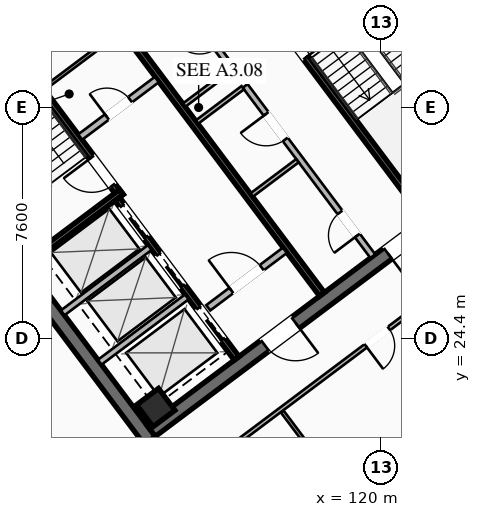
"""IFC4 building model, lengths in metres.
Left out: names, types, materials, properties, quantities, classifications, styles, units other than length and angle.
Written with IfcOpenShell. Run it as: python <this file> out.ifc"""

import sys

from ifc_helpers import new_model, si_unit, direction, frame, frame_2d, origin, origin_2d, place, context, subcontext, project, spatial, rectangle, hollow_rectangle, extrude, element, fill, save


model = new_model("IFC4")
c1 = context("Model", 3, precision=1e-05, world=origin(), true_north=direction((0.0, 1.0)))
c2 = subcontext(c1, "Body", "Model", "MODEL_VIEW")
j1 = project(units=[si_unit("LENGTHUNIT", "METRE"), si_unit("PLANEANGLEUNIT", "RADIAN")], contexts=[c1])
p1 = place(None, origin())
s1 = spatial("IfcSite", under=j1, at=p1, CompositionType="ELEMENT")
p2 = place(p1, origin())
s2 = spatial("IfcBuilding", under=s1, at=p2, CompositionType="ELEMENT")
p3 = place(p2, frame((0.0, 0.0, 214.85)))
s3 = spatial("IfcBuildingStorey", under=s2, at=p3, CompositionType="ELEMENT", Elevation=214.85)
for number, where, z_axis, x_axis in (
    (1, (112.396, 21.047, 0.0), (0.0, 0.0, 1.0), (-0.6, 0.8, 0.0)),
    (2, (115.604, 42.953, 0.0), (0.0, 0.0, 1.0), (0.6, -0.8, 0.0)),
):
    element("IfcWall", number, at=place(p3, frame(where, z_axis=z_axis, x_axis=x_axis)), inside=s3, PredefinedType="SHEAR", context=c2, shape_type="SweptSolid", body=[
        extrude(rectangle(XDim=15.6, YDim=0.45, at=frame_2d((7.8, 0.0))), origin(), (0.0, 0.0, 1.0), 3.55),
    ])
p4 = place(p3, frame((124.649, 30.518, 0.0), z_axis=(0.0, 0.0, 1.0), x_axis=(-0.8, -0.6, 0.0)))
e3 = element("IfcWall", 3, at=p4, inside=s3, PredefinedType="SHEAR", context=c2, shape_type="SweptSolid", body=[
    extrude(rectangle(XDim=15.26, YDim=0.45, at=frame_2d((7.63, 0.0))), origin(), (0.0, 0.0, 1.0), 3.55),
])
p5 = place(p4, frame((9.33, 0.0, 0.0)))
e4 = element("IfcOpeningElement", 4, at=p5, cuts=e3, PredefinedType="OPENING", context=c2, shape_type="SweptSolid", body=[
    extrude(rectangle(XDim=1.25, YDim=2.25, at=frame_2d((0.625, 1.125))), frame((0.0, 0.235, 0.0), z_axis=(0.0, -1.0, 0.0), x_axis=(1.0, 0.0, 0.0)), (0.0, 0.0, 1.0), 0.47),
])
p6 = place(p4, frame((4.28, 0.0, 0.0)))
e5 = element("IfcOpeningElement", 5, at=p6, cuts=e3, PredefinedType="OPENING", context=c2, shape_type="SweptSolid", body=[
    extrude(rectangle(XDim=1.25, YDim=2.25, at=frame_2d((0.625, 1.125))), frame((0.0, 0.235, 0.0), z_axis=(0.0, -1.0, 0.0), x_axis=(1.0, 0.0, 0.0)), (0.0, 0.0, 1.0), 0.47),
])
p7 = place(p3, frame((103.351, 33.482, 0.0), z_axis=(0.0, 0.0, 1.0), x_axis=(0.8, 0.6, 0.0)))
e6 = element("IfcWall", 6, at=p7, inside=s3, PredefinedType="SHEAR", context=c2, shape_type="SweptSolid", body=[
    extrude(rectangle(XDim=15.26, YDim=0.45, at=frame_2d((7.63, 0.0))), origin(), (0.0, 0.0, 1.0), 3.55),
])
p8 = place(p7, frame((4.68, 0.0, 0.0)))
e7 = element("IfcOpeningElement", 7, at=p8, cuts=e6, PredefinedType="OPENING", context=c2, shape_type="SweptSolid", body=[
    extrude(rectangle(XDim=1.25, YDim=2.25, at=frame_2d((0.625, 1.125))), frame((0.0, 0.235, 0.0), z_axis=(0.0, -1.0, 0.0), x_axis=(1.0, 0.0, 0.0)), (0.0, 0.0, 1.0), 0.47),
])
p9 = place(p7, frame((9.73, 0.0, 0.0)))
e8 = element("IfcOpeningElement", 8, at=p9, cuts=e6, PredefinedType="OPENING", context=c2, shape_type="SweptSolid", body=[
    extrude(rectangle(XDim=1.25, YDim=2.25, at=frame_2d((0.625, 1.125))), frame((0.0, 0.235, 0.0), z_axis=(0.0, -1.0, 0.0), x_axis=(1.0, 0.0, 0.0)), (0.0, 0.0, 1.0), 0.47),
])
p10 = place(p3, frame((112.59, 22.13, 0.0), z_axis=(0.0, 0.0, 1.0), x_axis=(0.799999996291, 0.600000004945, 0.0)))
e9 = element("IfcColumn", 9, at=p10, inside=s3, PredefinedType="COLUMN", context=c2, shape_type="SweptSolid", body=[
    extrude(hollow_rectangle(XDim=0.9, YDim=0.9, WallThickness=0.04, at=origin_2d()), origin(), (0.0, 0.0, 1.0), 3.37),
])
p11 = place(p3, frame((111.44, 29.08, 0.0), z_axis=(0.0, 0.0, 1.0), x_axis=(-0.59999041401, 0.800007189403, 0.0)))
e10 = element("IfcWall", 10, at=p11, inside=s3, PredefinedType="SHEAR", context=c2, shape_type="SweptSolid", body=[
    extrude(rectangle(XDim=8.15, YDim=0.2, at=frame_2d((4.075, 0.0))), origin(), (0.0, 0.0, 1.0), 3.37),
])
p12 = place(p11, frame((0.45, 0.0, 0.0)))
e11 = element("IfcOpeningElement", 11, at=p12, cuts=e10, PredefinedType="OPENING", context=c2, shape_type="SweptSolid", body=[
    extrude(rectangle(XDim=1.15, YDim=2.2, at=frame_2d((0.575, 1.1))), frame((0.0, 0.11, 0.0), z_axis=(0.0, -1.0, 0.0), x_axis=(1.0, 0.0, 0.0)), (0.0, 0.0, 1.0), 0.22),
])
p13 = place(p3, frame((108.316, 26.862, 0.0), z_axis=(0.0, 0.0, 1.0), x_axis=(0.800014909178, 0.599980120581, 0.0)))
e12 = element("IfcWall", 12, at=p13, inside=s3, PredefinedType="SHEAR", context=c2, shape_type="SweptSolid", body=[
    extrude(rectangle(XDim=3.93, YDim=0.2, at=frame_2d((1.965, 0.0))), origin(), (0.0, 0.0, 1.0), 3.37),
])
p14 = place(p3, frame((116.56, 34.92, 0.0), z_axis=(0.0, 0.0, 1.0), x_axis=(0.59999041401, -0.800007189403, 0.0)))
e13 = element("IfcWall", 13, at=p14, inside=s3, PredefinedType="SHEAR", context=c2, shape_type="SweptSolid", body=[
    extrude(rectangle(XDim=8.15, YDim=0.2, at=frame_2d((4.075, 0.0))), origin(), (0.0, 0.0, 1.0), 3.37),
])
p15 = place(p14, frame((0.45, 0.0, 0.0)))
e14 = element("IfcOpeningElement", 14, at=p15, cuts=e13, PredefinedType="OPENING", context=c2, shape_type="SweptSolid", body=[
    extrude(rectangle(XDim=1.15, YDim=2.2, at=frame_2d((0.575, 1.1))), frame((0.0, 0.11, 0.0), z_axis=(0.0, -1.0, 0.0), x_axis=(1.0, 0.0, 0.0)), (0.0, 0.0, 1.0), 0.22),
])
p16 = place(p3, frame((118.058, 25.856, 0.0), z_axis=(0.0, 0.0, 1.0), x_axis=(-0.600002657301, 0.799998007018, 0.0)))
e15 = element("IfcWall", 15, at=p16, inside=s3, PredefinedType="SHEAR", context=c2, shape_type="SweptSolid", body=[
    extrude(rectangle(XDim=14.7, YDim=0.2, at=frame_2d((7.35, 0.0))), origin(), (0.0, 0.0, 1.0), 3.37),
])
p17 = place(p3, frame((110.104, 31.028, 0.0), z_axis=(0.0, 0.0, 1.0), x_axis=(0.800018601094, 0.59997519774, 0.0)))
e16 = element("IfcWall", 16, at=p17, inside=s3, PredefinedType="SOLIDWALL", context=c2, shape_type="SweptSolid", body=[
    extrude(rectangle(XDim=3.15, YDim=0.22, at=frame_2d((1.575, 0.0))), origin(), (0.0, 0.0, 1.0), 2.723),
])
p18 = place(p17, frame((1.1, 0.0, 0.0)))
e17 = element("IfcOpeningElement", 17, at=p18, cuts=e16, PredefinedType="OPENING", context=c2, shape_type="SweptSolid", body=[
    extrude(rectangle(XDim=0.95, YDim=2.05, at=frame_2d((0.475, 1.025))), frame((0.0, 0.12, 0.0), z_axis=(0.0, -1.0, 0.0), x_axis=(1.0, 0.0, 0.0)), (0.0, 0.0, 1.0), 0.24),
])
p19 = place(p3, frame((114.316, 25.412, 0.0), z_axis=(0.0, 0.0, 1.0), x_axis=(0.800018601094, 0.59997519774, 0.0)))
e18 = element("IfcWall", 18, at=p19, inside=s3, PredefinedType="SOLIDWALL", context=c2, shape_type="SweptSolid", body=[
    extrude(rectangle(XDim=3.15, YDim=0.22, at=frame_2d((1.575, 0.0))), origin(), (0.0, 0.0, 1.0), 2.723),
])
p20 = place(p19, frame((0.95, 0.0, 0.0)))
e19 = element("IfcOpeningElement", 19, at=p20, cuts=e18, PredefinedType="OPENING", context=c2, shape_type="SweptSolid", body=[
    extrude(rectangle(XDim=1.25, YDim=2.25, at=frame_2d((0.625, 1.125))), frame((0.0, 0.12, 0.0), z_axis=(0.0, -1.0, 0.0), x_axis=(1.0, 0.0, 0.0)), (0.0, 0.0, 1.0), 0.24),
])
p21 = place(p3, frame((115.25, 23.75, 0.0), z_axis=(0.0, 0.0, 1.0), x_axis=(-0.599994036198, 0.800004472816, 0.0)))
e20 = element("IfcWall", 20, at=p21, inside=s3, PredefinedType="SHEAR", context=c2, shape_type="SweptSolid", body=[
    extrude(rectangle(XDim=6.55, YDim=0.2, at=frame_2d((3.275, 0.0))), origin(), (0.0, 0.0, 1.0), 3.37),
])
p22 = place(p21, frame((4.975, 0.0, 0.0)))
e21 = element("IfcOpeningElement", 21, at=p22, cuts=e20, PredefinedType="OPENING", context=c2, shape_type="SweptSolid", body=[
    extrude(rectangle(XDim=1.3, YDim=2.25, at=frame_2d((0.65, 1.125))), frame((0.0, 0.11, 0.0), z_axis=(0.0, -1.0, 0.0), x_axis=(1.0, 0.0, 0.0)), (0.0, 0.0, 1.0), 0.22),
])
p23 = place(p21, frame((2.975, 0.0, 0.0)))
e22 = element("IfcOpeningElement", 22, at=p23, cuts=e20, PredefinedType="OPENING", context=c2, shape_type="SweptSolid", body=[
    extrude(rectangle(XDim=1.3, YDim=2.25, at=frame_2d((0.65, 1.125))), frame((0.0, 0.11, 0.0), z_axis=(0.0, -1.0, 0.0), x_axis=(1.0, 0.0, 0.0)), (0.0, 0.0, 1.0), 0.22),
])
p24 = place(p21, frame((0.775, 0.0, 0.0)))
e23 = element("IfcOpeningElement", 23, at=p24, cuts=e20, PredefinedType="OPENING", context=c2, shape_type="SweptSolid", body=[
    extrude(rectangle(XDim=1.3, YDim=2.25, at=frame_2d((0.65, 1.125))), frame((0.0, 0.11, 0.0), z_axis=(0.0, -1.0, 0.0), x_axis=(1.0, 0.0, 0.0)), (0.0, 0.0, 1.0), 0.22),
])
for number, where, z_axis, x_axis in (
    (24, (110.746, 23.622, 0.0), (0.0, 0.0, 1.0), (0.8, 0.6, 0.0)),
    (25, (109.528, 25.246, 0.0), (0.0, 0.0, 1.0), (0.8, 0.6, 0.0)),
):
    element("IfcWall", number, at=place(p3, frame(where, z_axis=z_axis, x_axis=x_axis)), inside=s3, PredefinedType="SOLIDWALL", context=c2, shape_type="SweptSolid", body=[
        extrude(rectangle(XDim=3.58, YDim=0.2, at=frame_2d((1.79, 0.0))), origin(), (0.0, 0.0, 1.0), 3.37),
    ])
p25 = place(p3, frame((108.91, 32.62, 0.0), z_axis=(0.0, 0.0, 1.0), x_axis=(0.800018601094, 0.59997519774, 0.0)))
e26 = element("IfcWall", 26, at=p25, inside=s3, PredefinedType="PARTITIONING", context=c2, shape_type="SweptSolid", body=[
    extrude(rectangle(XDim=3.15, YDim=0.11, at=frame_2d((1.575, 0.0))), origin(), (0.0, 0.0, 1.0), 2.723),
])
p26 = place(p3, frame((119.73, 27.11, 0.0), z_axis=(0.0, 0.0, 1.0), x_axis=(-0.600005580459, 0.799995814625, 0.0)))
e27 = element("IfcWall", 27, at=p26, inside=s3, PredefinedType="SOLIDWALL", context=c2, shape_type="SweptSolid", body=[
    extrude(rectangle(XDim=7.0, YDim=0.2, at=frame_2d((3.5, 0.0))), origin(), (0.0, 0.0, 1.0), 2.723),
])
p27 = place(p26, frame((0.85, 0.0, 0.0)))
e28 = element("IfcOpeningElement", 28, at=p27, cuts=e27, PredefinedType="OPENING", context=c2, shape_type="SweptSolid", body=[
    extrude(rectangle(XDim=0.95, YDim=2.05, at=frame_2d((0.475, 1.025))), frame((0.0, 0.11, 0.0), z_axis=(0.0, -1.0, 0.0), x_axis=(1.0, 0.0, 0.0)), (0.0, 0.0, 1.0), 0.22),
])
p28 = place(p26, frame((4.8, 0.0, 0.0)))
e29 = element("IfcOpeningElement", 29, at=p28, cuts=e27, PredefinedType="OPENING", context=c2, shape_type="SweptSolid", body=[
    extrude(rectangle(XDim=1.05, YDim=2.2, at=frame_2d((0.525, 1.1))), frame((0.0, 0.11, 0.0), z_axis=(0.0, -1.0, 0.0), x_axis=(1.0, 0.0, 0.0)), (0.0, 0.0, 1.0), 0.22),
])
for number, where, z_axis, x_axis in (
    (30, (113.946, 31.522, 0.0), (0.0, 0.0, 1.0), (0.8, 0.6, 0.0)),
    (31, (115.746, 29.122, 0.0), (0.0, 0.0, 1.0), (0.8, 0.6, 0.0)),
):
    element("IfcWall", number, at=place(p3, frame(where, z_axis=z_axis, x_axis=x_axis)), inside=s3, PredefinedType="PARTITIONING", context=c2, shape_type="SweptSolid", body=[
        extrude(rectangle(XDim=1.88, YDim=0.135, at=frame_2d((0.94, 0.0))), origin(), (0.0, 0.0, 1.0), 2.723),
    ])
p29 = place(p3, frame((115.11, 33.27, 0.0), z_axis=(0.0, 0.0, 1.0), x_axis=(-0.600011160345, 0.79999162962, 0.0)))
e32 = element("IfcWall", 32, at=p29, inside=s3, PredefinedType="SOLIDWALL", context=c2, shape_type="SweptSolid", body=[
    extrude(rectangle(XDim=7.0, YDim=0.2, at=frame_2d((3.5, 0.0))), origin(), (0.0, 0.0, 1.0), 2.723),
])
p30 = place(p29, frame((0.85, 0.0, 0.0)))
e33 = element("IfcOpeningElement", 33, at=p30, cuts=e32, PredefinedType="OPENING", context=c2, shape_type="SweptSolid", body=[
    extrude(rectangle(XDim=0.95, YDim=2.05, at=frame_2d((0.475, 1.025))), frame((0.0, 0.11, 0.0), z_axis=(0.0, -1.0, 0.0), x_axis=(1.0, 0.0, 0.0)), (0.0, 0.0, 1.0), 0.22),
])
p31 = place(p29, frame((4.85, 0.0, 0.0)))
e34 = element("IfcOpeningElement", 34, at=p31, cuts=e32, PredefinedType="OPENING", context=c2, shape_type="SweptSolid", body=[
    extrude(rectangle(XDim=0.95, YDim=2.05, at=frame_2d((0.475, 1.025))), frame((0.0, 0.11, 0.0), z_axis=(0.0, -1.0, 0.0), x_axis=(1.0, 0.0, 0.0)), (0.0, 0.0, 1.0), 0.22),
])
p32 = place(p3, frame((113.526, 32.082, 0.0), z_axis=(0.0, 0.0, 1.0), x_axis=(0.800046745961, 0.599937666993, 0.0)))
e35 = element("IfcWall", 35, at=p32, inside=s3, PredefinedType="PARTITIONING", context=c2, shape_type="SweptSolid", body=[
    extrude(rectangle(XDim=1.88, YDim=0.135, at=frame_2d((0.94, 0.0))), origin(), (0.0, 0.0, 1.0), 2.723),
])
p33 = place(p3, frame((123.262, 26.984, 0.0), z_axis=(0.0, 0.0, 1.0), x_axis=(-0.800005696094, -0.599992405132, 0.0)))
e36 = element("IfcWall", 36, at=p33, inside=s3, PredefinedType="PARTITIONING", context=c2, shape_type="SweptSolid", body=[
    extrude(rectangle(XDim=15.43, YDim=0.135, at=frame_2d((7.715, 0.0))), origin(), (0.0, 0.0, 1.0), 2.723),
])
p34 = place(p33, frame((14.1, 0.0, 0.0)))
e37 = element("IfcOpeningElement", 37, at=p34, cuts=e36, PredefinedType="OPENING", context=c2, shape_type="SweptSolid", body=[
    extrude(rectangle(XDim=0.95, YDim=2.05, at=frame_2d((0.475, 1.025))), frame((0.0, 0.077, 0.0), z_axis=(0.0, -1.0, 0.0), x_axis=(1.0, 0.0, 0.0)), (0.0, 0.0, 1.0), 0.155),
])
p35 = place(p33, frame((3.755, 0.0, 0.0)))
e38 = element("IfcOpeningElement", 38, at=p35, cuts=e36, PredefinedType="OPENING", context=c2, shape_type="SweptSolid", body=[
    extrude(rectangle(XDim=0.95, YDim=2.05, at=frame_2d((0.475, 1.025))), frame((0.0, 0.077, 0.0), z_axis=(0.0, -1.0, 0.0), x_axis=(1.0, 0.0, 0.0)), (0.0, 0.0, 1.0), 0.155),
])
p36 = place(p3, frame((120.248, 17.336, 0.0), z_axis=(0.0, 0.0, 1.0), x_axis=(-0.6, 0.8, 0.0)))
e39 = element("IfcWall", 39, at=p36, inside=s3, PredefinedType="PARTITIONING", context=c2, shape_type="SweptSolid", body=[
    extrude(rectangle(XDim=5.83, YDim=0.11, at=frame_2d((2.915, 0.0))), origin(), (0.0, 0.0, 1.0), 2.723),
])
p37 = place(p3, frame((110.87, 17.79, 0.0), z_axis=(0.0, 0.0, 1.0), x_axis=(-0.6, 0.8, 0.0)))
e40 = element("IfcWall", 40, at=p37, inside=s3, PredefinedType="PARTITIONING", context=c2, shape_type="SweptSolid", body=[
    extrude(rectangle(XDim=20.26, YDim=0.135, at=frame_2d((10.13, 0.0))), origin(), (0.0, 0.0, 1.0), 2.723),
])
p38 = place(p37, frame((19.01, 0.0, 0.0)))
e41 = element("IfcOpeningElement", 41, at=p38, cuts=e40, PredefinedType="OPENING", context=c2, shape_type="SweptSolid", body=[
    extrude(rectangle(XDim=0.95, YDim=2.05, at=frame_2d((0.475, 1.025))), frame((0.0, 0.077, 0.0), z_axis=(0.0, -1.0, 0.0), x_axis=(1.0, 0.0, 0.0)), (0.0, 0.0, 1.0), 0.155),
])
p39 = place(p5, origin())
e42 = element("IfcDoor", 42, at=p39, inside=s3, OperationType="SINGLE_SWING_LEFT", PredefinedType="DOOR", context=c2, shape_type="SweptSolid", body=[
    extrude(rectangle(XDim=1.25, YDim=2.25, at=frame_2d((0.625, 1.125))), frame((0.0, 0.025, 0.0), z_axis=(0.0, -1.0, 0.0), x_axis=(1.0, 0.0, 0.0)), (0.0, 0.0, 1.0), 0.05),
])
fill(e4, e42)
p40 = place(p6, origin())
e43 = element("IfcDoor", 43, at=p40, inside=s3, OperationType="SINGLE_SWING_RIGHT", PredefinedType="DOOR", context=c2, shape_type="SweptSolid", body=[
    extrude(rectangle(XDim=1.25, YDim=2.25, at=frame_2d((0.625, 1.125))), frame((0.0, 0.025, 0.0), z_axis=(0.0, -1.0, 0.0), x_axis=(1.0, 0.0, 0.0)), (0.0, 0.0, 1.0), 0.05),
])
fill(e5, e43)
p41 = place(p12, origin())
e44 = element("IfcDoor", 44, at=p41, inside=s3, OperationType="SINGLE_SWING_RIGHT", PredefinedType="DOOR", context=c2, shape_type="SweptSolid", body=[
    extrude(rectangle(XDim=1.15, YDim=2.2, at=frame_2d((0.575, 1.1))), frame((0.0, 0.025, 0.0), z_axis=(0.0, -1.0, 0.0), x_axis=(1.0, 0.0, 0.0)), (0.0, 0.0, 1.0), 0.05),
])
fill(e11, e44)
p42 = place(p15, origin())
e45 = element("IfcDoor", 45, at=p42, inside=s3, OperationType="SINGLE_SWING_RIGHT", PredefinedType="DOOR", context=c2, shape_type="SweptSolid", body=[
    extrude(rectangle(XDim=1.15, YDim=2.2, at=frame_2d((0.575, 1.1))), frame((0.0, 0.025, 0.0), z_axis=(0.0, -1.0, 0.0), x_axis=(1.0, 0.0, 0.0)), (0.0, 0.0, 1.0), 0.05),
])
fill(e14, e45)
p43 = place(p20, origin())
e46 = element("IfcDoor", 46, at=p43, inside=s3, OperationType="SINGLE_SWING_LEFT", PredefinedType="DOOR", context=c2, shape_type="SweptSolid", body=[
    extrude(rectangle(XDim=1.25, YDim=2.25, at=frame_2d((0.625, 1.125))), frame((0.0, 0.025, 0.0), z_axis=(0.0, -1.0, 0.0), x_axis=(1.0, 0.0, 0.0)), (0.0, 0.0, 1.0), 0.05),
])
fill(e19, e46)
p44 = place(p18, origin())
e47 = element("IfcDoor", 47, at=p44, inside=s3, OperationType="SINGLE_SWING_LEFT", PredefinedType="DOOR", context=c2, shape_type="SweptSolid", body=[
    extrude(rectangle(XDim=0.95, YDim=2.05, at=frame_2d((0.475, 1.025))), frame((0.0, 0.025, 0.0), z_axis=(0.0, -1.0, 0.0), x_axis=(1.0, 0.0, 0.0)), (0.0, 0.0, 1.0), 0.05),
])
fill(e17, e47)
p45 = place(p27, origin())
e48 = element("IfcDoor", 48, at=p45, inside=s3, OperationType="SINGLE_SWING_LEFT", PredefinedType="DOOR", context=c2, shape_type="SweptSolid", body=[
    extrude(rectangle(XDim=0.95, YDim=2.05, at=frame_2d((0.475, 1.025))), frame((0.0, 0.025, 0.0), z_axis=(0.0, -1.0, 0.0), x_axis=(1.0, 0.0, 0.0)), (0.0, 0.0, 1.0), 0.05),
])
fill(e28, e48)
p46 = place(p28, origin())
e49 = element("IfcDoor", 49, at=p46, inside=s3, OperationType="SINGLE_SWING_RIGHT", PredefinedType="DOOR", context=c2, shape_type="SweptSolid", body=[
    extrude(rectangle(XDim=1.05, YDim=2.2, at=frame_2d((0.525, 1.1))), frame((0.0, 0.025, 0.0), z_axis=(0.0, -1.0, 0.0), x_axis=(1.0, 0.0, 0.0)), (0.0, 0.0, 1.0), 0.05),
])
fill(e29, e49)
p47 = place(p35, origin())
e50 = element("IfcDoor", 50, at=p47, inside=s3, OperationType="SINGLE_SWING_RIGHT", PredefinedType="DOOR", context=c2, shape_type="SweptSolid", body=[
    extrude(rectangle(XDim=0.95, YDim=2.05, at=frame_2d((0.475, 1.025))), frame((0.0, 0.025, 0.0), z_axis=(0.0, -1.0, 0.0), x_axis=(1.0, 0.0, 0.0)), (0.0, 0.0, 1.0), 0.05),
])
fill(e38, e50)
p48 = place(p22, origin())
e51 = element("IfcDoor", 51, at=p48, inside=s3, OperationType="SLIDING_TO_LEFT", PredefinedType="DOOR", context=c2, shape_type="SweptSolid", body=[
    extrude(rectangle(XDim=1.3, YDim=2.25, at=frame_2d((0.65, 1.125))), frame((0.0, 0.025, 0.0), z_axis=(0.0, -1.0, 0.0), x_axis=(1.0, 0.0, 0.0)), (0.0, 0.0, 1.0), 0.05),
])
fill(e21, e51)
p49 = place(p23, origin())
e52 = element("IfcDoor", 52, at=p49, inside=s3, OperationType="SLIDING_TO_LEFT", PredefinedType="DOOR", context=c2, shape_type="SweptSolid", body=[
    extrude(rectangle(XDim=1.3, YDim=2.25, at=frame_2d((0.65, 1.125))), frame((0.0, 0.025, 0.0), z_axis=(0.0, -1.0, 0.0), x_axis=(1.0, 0.0, 0.0)), (0.0, 0.0, 1.0), 0.05),
])
fill(e22, e52)
p50 = place(p24, origin())
e53 = element("IfcDoor", 53, at=p50, inside=s3, OperationType="SLIDING_TO_LEFT", PredefinedType="DOOR", context=c2, shape_type="SweptSolid", body=[
    extrude(rectangle(XDim=1.3, YDim=2.25, at=frame_2d((0.65, 1.125))), frame((0.0, 0.025, 0.0), z_axis=(0.0, -1.0, 0.0), x_axis=(1.0, 0.0, 0.0)), (0.0, 0.0, 1.0), 0.05),
])
fill(e23, e53)
save(model, sys.argv[1])
